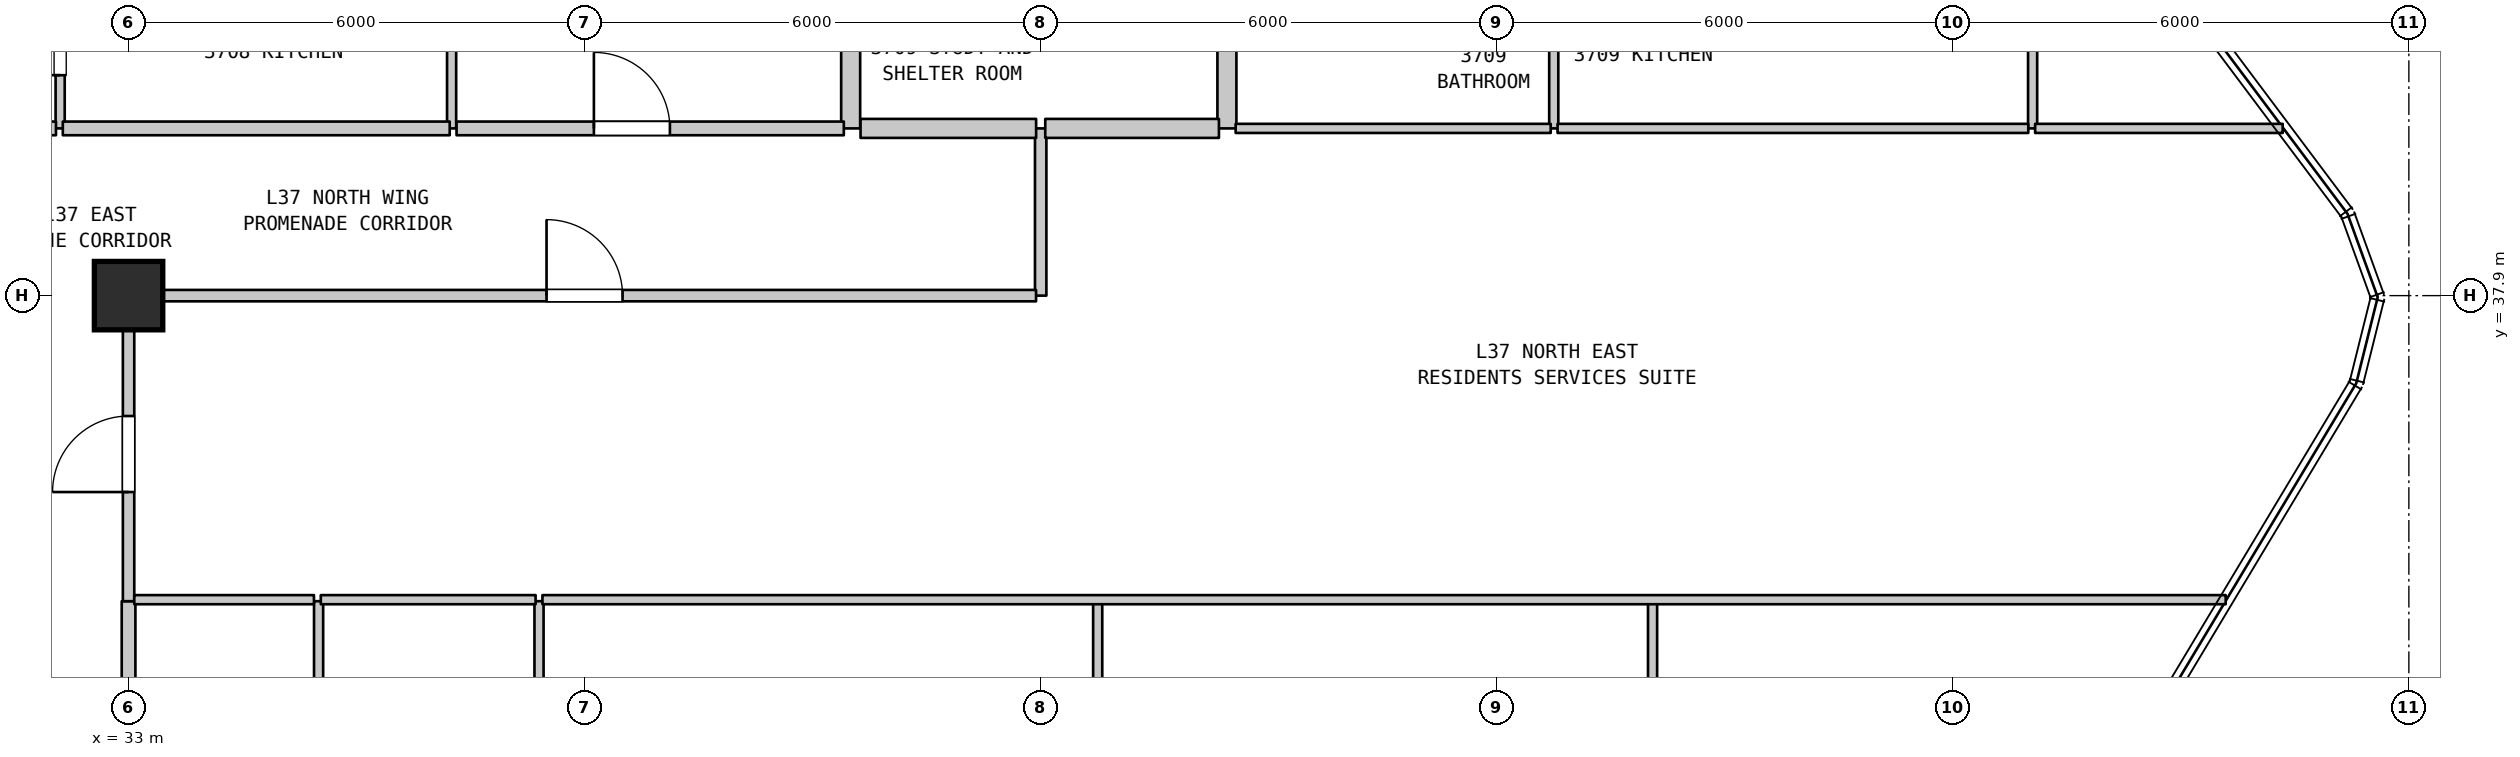
"""IFC4 building model, lengths in metres.
Left out: names, types, materials, properties, quantities, classifications, styles, units other than length and angle.
Written with IfcOpenShell. Run it as: python <this file> out.ifc"""

import sys

from ifc_helpers import new_model, si_unit, direction, frame, frame_2d, origin, origin_2d, place, context, subcontext, project, spatial, rectangle, extrude, element, fill, save


model = new_model("IFC4")
c1 = context("Model", 3, precision=1e-05, world=origin(), true_north=direction((0.0, 1.0)))
c2 = subcontext(c1, "Body", "Model", "MODEL_VIEW")
j1 = project(units=[si_unit("LENGTHUNIT", "METRE"), si_unit("PLANEANGLEUNIT", "RADIAN")], contexts=[c1])
p1 = place(None, origin())
s1 = spatial("IfcSite", under=j1, at=p1, CompositionType="ELEMENT")
p2 = place(p1, origin())
s2 = spatial("IfcBuilding", under=s1, at=p2, CompositionType="ELEMENT")
p3 = place(p2, frame((0.0, 0.0, 152.0)))
s3 = spatial("IfcBuildingStorey", under=s2, at=p3, CompositionType="ELEMENT", Elevation=152.0)
p4 = place(p3, frame((33.0, 37.9, 0.0), z_axis=(0.0, 0.0, 1.0), x_axis=(1.0, 0.0, 0.0)))
e1 = element("IfcColumn", 1, at=p4, inside=s3, PredefinedType="COLUMN", context=c2, shape_type="SweptSolid", body=[
    extrude(rectangle(XDim=0.9, YDim=0.9, at=origin_2d()), origin(), (0.0, 0.0, 1.0), 3.7),
])
p5 = place(p3, frame((32.1, 40.1, 0.0), z_axis=(0.0, 0.0, 1.0), x_axis=(0.0, 1.0, 0.0)))
e2 = element("IfcWall", 2, at=p5, inside=s3, PredefinedType="PARTITIONING", context=c2, shape_type="SweptSolid", body=[
    extrude(rectangle(XDim=2.3, YDim=0.12, at=frame_2d((1.15, 0.0))), origin(), (0.0, 0.0, 1.0), 3.385),
])
p6 = place(p5, frame((0.7, 0.0, 0.0)))
e3 = element("IfcOpeningElement", 3, at=p6, cuts=e2, PredefinedType="OPENING", context=c2, shape_type="SweptSolid", body=[
    extrude(rectangle(XDim=0.9, YDim=2.15, at=frame_2d((0.45, 1.075))), frame((0.0, 0.07, 0.0), z_axis=(0.0, -1.0, 0.0), x_axis=(1.0, 0.0, 0.0)), (0.0, 0.0, 1.0), 0.14),
])
p7 = place(p3, frame((33.0, 30.16, 0.0), z_axis=(0.0, 0.0, 1.0), x_axis=(0.0, 1.0, 0.0)))
e4 = element("IfcWall", 4, at=p7, inside=s3, PredefinedType="STANDARD", context=c2, shape_type="SweptSolid", body=[
    extrude(rectangle(XDim=3.72, YDim=0.18, at=frame_2d((1.86, 0.0))), origin(), (0.0, 0.0, 1.0), 2.885),
])
p8 = place(p3, frame((33.0, 33.88, 0.0), z_axis=(0.0, 0.0, 1.0), x_axis=(0.0, 1.0, 0.0)))
e5 = element("IfcWall", 5, at=p8, inside=s3, PredefinedType="STANDARD", context=c2, shape_type="SweptSolid", body=[
    extrude(rectangle(XDim=4.02, YDim=0.15, at=frame_2d((2.01, 0.0))), origin(), (0.0, 0.0, 1.0), 2.885),
])
p9 = place(p8, frame((1.436, 0.0, 0.0)))
e6 = element("IfcOpeningElement", 6, at=p9, cuts=e5, PredefinedType="OPENING", context=c2, shape_type="SweptSolid", body=[
    extrude(rectangle(XDim=1.0, YDim=2.15, at=frame_2d((0.5, 1.075))), frame((0.0, 0.085, 0.0), z_axis=(0.0, -1.0, 0.0), x_axis=(1.0, 0.0, 0.0)), (0.0, 0.0, 1.0), 0.17),
])
p10 = place(p3, frame((35.5, 30.16, 0.0), z_axis=(0.0, 0.0, 1.0), x_axis=(0.0, 1.0, 0.0)))
e7 = element("IfcWall", 7, at=p10, inside=s3, PredefinedType="PARTITIONING", context=c2, shape_type="SweptSolid", body=[
    extrude(rectangle(XDim=3.72, YDim=0.12, at=frame_2d((1.86, 0.0))), origin(), (0.0, 0.0, 1.0), 3.385),
])
p11 = place(p3, frame((37.25, 40.1, 0.0), z_axis=(0.0, 0.0, 1.0), x_axis=(0.0, 1.0, 0.0)))
e8 = element("IfcWall", 8, at=p11, inside=s3, PredefinedType="PARTITIONING", context=c2, shape_type="SweptSolid", body=[
    extrude(rectangle(XDim=2.05, YDim=0.12, at=frame_2d((1.025, 0.0))), origin(), (0.0, 0.0, 1.0), 3.385),
])
p12 = place(p3, frame((38.4, 30.16, 0.0), z_axis=(0.0, 0.0, 1.0), x_axis=(0.0, 1.0, 0.0)))
e9 = element("IfcWall", 9, at=p12, inside=s3, PredefinedType="PARTITIONING", context=c2, shape_type="SweptSolid", body=[
    extrude(rectangle(XDim=3.72, YDim=0.12, at=frame_2d((1.86, 0.0))), origin(), (0.0, 0.0, 1.0), 3.385),
])
p13 = place(p3, frame((42.5, 40.1, 0.0), z_axis=(0.0, 0.0, 1.0), x_axis=(0.0, 1.0, 0.0)))
e10 = element("IfcWall", 10, at=p13, inside=s3, PredefinedType="STANDARD", context=c2, shape_type="SweptSolid", body=[
    extrude(rectangle(XDim=2.3, YDim=0.25, at=frame_2d((1.15, 0.0))), origin(), (0.0, 0.0, 1.0), 3.385),
])
p14 = place(p3, frame((45.0, 37.9, 0.0), z_axis=(0.0, 0.0, 1.0), x_axis=(0.0, 1.0, 0.0)))
e11 = element("IfcWall", 11, at=p14, inside=s3, PredefinedType="STANDARD", context=c2, shape_type="SweptSolid", body=[
    extrude(rectangle(XDim=2.2, YDim=0.15, at=frame_2d((1.1, 0.0))), origin(), (0.0, 0.0, 1.0), 3.385),
])
p15 = place(p3, frame((45.75, 30.16, 0.0), z_axis=(0.0, 0.0, 1.0), x_axis=(0.0, 1.0, 0.0)))
e12 = element("IfcWall", 12, at=p15, inside=s3, PredefinedType="PARTITIONING", context=c2, shape_type="SweptSolid", body=[
    extrude(rectangle(XDim=3.72, YDim=0.12, at=frame_2d((1.86, 0.0))), origin(), (0.0, 0.0, 1.0), 3.385),
])
p16 = place(p3, frame((47.45, 40.1, 0.0), z_axis=(0.0, 0.0, 1.0), x_axis=(0.0, 1.0, 0.0)))
e13 = element("IfcWall", 13, at=p16, inside=s3, PredefinedType="STANDARD", context=c2, shape_type="SweptSolid", body=[
    extrude(rectangle(XDim=2.3, YDim=0.25, at=frame_2d((1.15, 0.0))), origin(), (0.0, 0.0, 1.0), 3.385),
])
p17 = place(p3, frame((51.75, 40.1, 0.0), z_axis=(0.0, 0.0, 1.0), x_axis=(0.0, 1.0, 0.0)))
e14 = element("IfcWall", 14, at=p17, inside=s3, PredefinedType="PARTITIONING", context=c2, shape_type="SweptSolid", body=[
    extrude(rectangle(XDim=2.3, YDim=0.12, at=frame_2d((1.15, 0.0))), origin(), (0.0, 0.0, 1.0), 3.385),
])
p18 = place(p3, frame((53.05, 30.16, 0.0), z_axis=(0.0, 0.0, 1.0), x_axis=(0.0, 1.0, 0.0)))
e15 = element("IfcWall", 15, at=p18, inside=s3, PredefinedType="PARTITIONING", context=c2, shape_type="SweptSolid", body=[
    extrude(rectangle(XDim=3.72, YDim=0.12, at=frame_2d((1.86, 0.0))), origin(), (0.0, 0.0, 1.0), 3.385),
])
p19 = place(p3, frame((58.05, 40.1, 0.0), z_axis=(0.0, 0.0, 1.0), x_axis=(0.0, 1.0, 0.0)))
e16 = element("IfcWall", 16, at=p19, inside=s3, PredefinedType="PARTITIONING", context=c2, shape_type="SweptSolid", body=[
    extrude(rectangle(XDim=2.3, YDim=0.12, at=frame_2d((1.15, 0.0))), origin(), (0.0, 0.0, 1.0), 3.385),
])
p20 = place(p3, frame((33.075, 33.9, 0.0), z_axis=(0.0, 0.0, 1.0), x_axis=(1.0, 0.0, 0.0)))
e17 = element("IfcWall", 17, at=p20, inside=s3, PredefinedType="PARTITIONING", context=c2, shape_type="SweptSolid", body=[
    extrude(rectangle(XDim=2.364, YDim=0.12, at=frame_2d((1.182, 0.0))), origin(), (0.0, 0.0, 1.0), 3.385),
])
p21 = place(p3, frame((35.529, 33.9, 0.0), z_axis=(0.0, 0.0, 1.0), x_axis=(1.0, 0.0, 0.0)))
e18 = element("IfcWall", 18, at=p21, inside=s3, PredefinedType="PARTITIONING", context=c2, shape_type="SweptSolid", body=[
    extrude(rectangle(XDim=2.826, YDim=0.12, at=frame_2d((1.413, 0.0))), origin(), (0.0, 0.0, 1.0), 3.385),
])
p22 = place(p3, frame((38.445, 33.9, 0.0), z_axis=(0.0, 0.0, 1.0), x_axis=(1.0, 0.0, 0.0)))
e19 = element("IfcWall", 19, at=p22, inside=s3, PredefinedType="PARTITIONING", context=c2, shape_type="SweptSolid", body=[
    extrude(rectangle(XDim=22.145, YDim=0.12, at=frame_2d((11.073, 0.0))), origin(), (0.0, 0.0, 1.0), 3.385),
])
p23 = place(p3, frame((33.06, 37.9, 0.0), z_axis=(0.0, 0.0, 1.0), x_axis=(1.0, 0.0, 0.0)))
e20 = element("IfcWall", 20, at=p23, inside=s3, PredefinedType="STANDARD", context=c2, shape_type="SweptSolid", body=[
    extrude(rectangle(XDim=11.879, YDim=0.15, at=frame_2d((5.939, 0.0))), origin(), (0.0, 0.0, 1.0), 3.385),
])
p24 = place(p23, frame((5.439, 0.0, 0.0)))
e21 = element("IfcOpeningElement", 21, at=p24, cuts=e20, PredefinedType="OPENING", context=c2, shape_type="SweptSolid", body=[
    extrude(rectangle(XDim=1.0, YDim=2.15, at=frame_2d((0.5, 1.075))), frame((0.0, 0.085, 0.0), z_axis=(0.0, -1.0, 0.0), x_axis=(1.0, 0.0, 0.0)), (0.0, 0.0, 1.0), 0.17),
])
p25 = place(p3, frame((28.535, 40.1, 0.0), z_axis=(0.0, 0.0, 1.0), x_axis=(1.0, 0.0, 0.0)))
e22 = element("IfcWall", 22, at=p25, inside=s3, PredefinedType="STANDARD", context=c2, shape_type="SweptSolid", body=[
    extrude(rectangle(XDim=3.51, YDim=0.18, at=frame_2d((1.755, 0.0))), origin(), (0.0, 0.0, 1.0), 3.385),
])
p26 = place(p25, frame((1.185, 0.0, 0.0)))
e23 = element("IfcOpeningElement", 23, at=p26, cuts=e22, PredefinedType="OPENING", context=c2, shape_type="SweptSolid", body=[
    extrude(rectangle(XDim=1.0, YDim=2.15, at=frame_2d((0.5, 1.075))), frame((0.0, 0.1, 0.0), z_axis=(0.0, -1.0, 0.0), x_axis=(1.0, 0.0, 0.0)), (0.0, 0.0, 1.0), 0.2),
])
p27 = place(p3, frame((32.135, 40.1, 0.0), z_axis=(0.0, 0.0, 1.0), x_axis=(1.0, 0.0, 0.0)))
e24 = element("IfcWall", 24, at=p27, inside=s3, PredefinedType="STANDARD", context=c2, shape_type="SweptSolid", body=[
    extrude(rectangle(XDim=5.09, YDim=0.18, at=frame_2d((2.545, 0.0))), origin(), (0.0, 0.0, 1.0), 3.385),
])
p28 = place(p3, frame((37.315, 40.1, 0.0), z_axis=(0.0, 0.0, 1.0), x_axis=(1.0, 0.0, 0.0)))
e25 = element("IfcWall", 25, at=p28, inside=s3, PredefinedType="STANDARD", context=c2, shape_type="SweptSolid", body=[
    extrude(rectangle(XDim=5.095, YDim=0.18, at=frame_2d((2.547, 0.0))), origin(), (0.0, 0.0, 1.0), 3.385),
])
p29 = place(p28, frame((1.807, 0.0, 0.0)))
e26 = element("IfcOpeningElement", 26, at=p29, cuts=e25, PredefinedType="OPENING", context=c2, shape_type="SweptSolid", body=[
    extrude(rectangle(XDim=1.0, YDim=2.15, at=frame_2d((0.5, 1.075))), frame((0.0, 0.1, 0.0), z_axis=(0.0, -1.0, 0.0), x_axis=(1.0, 0.0, 0.0)), (0.0, 0.0, 1.0), 0.2),
])
p30 = place(p3, frame((42.63, 40.1, 0.0), z_axis=(0.0, 0.0, 1.0), x_axis=(1.0, 0.0, 0.0)))
e27 = element("IfcWall", 27, at=p30, inside=s3, PredefinedType="STANDARD", context=c2, shape_type="SweptSolid", body=[
    extrude(rectangle(XDim=2.31, YDim=0.25, at=frame_2d((1.155, 0.0))), origin(), (0.0, 0.0, 1.0), 3.385),
])
p31 = place(p3, frame((45.06, 40.1, 0.0), z_axis=(0.0, 0.0, 1.0), x_axis=(1.0, 0.0, 0.0)))
e28 = element("IfcWall", 28, at=p31, inside=s3, PredefinedType="STANDARD", context=c2, shape_type="SweptSolid", body=[
    extrude(rectangle(XDim=2.285, YDim=0.25, at=frame_2d((1.143, 0.0))), origin(), (0.0, 0.0, 1.0), 3.385),
])
p32 = place(p3, frame((47.565, 40.1, 0.0), z_axis=(0.0, 0.0, 1.0), x_axis=(1.0, 0.0, 0.0)))
e29 = element("IfcWall", 29, at=p32, inside=s3, PredefinedType="PARTITIONING", context=c2, shape_type="SweptSolid", body=[
    extrude(rectangle(XDim=4.145, YDim=0.12, at=frame_2d((2.073, 0.0))), origin(), (0.0, 0.0, 1.0), 3.385),
])
p33 = place(p3, frame((51.8, 40.1, 0.0), z_axis=(0.0, 0.0, 1.0), x_axis=(1.0, 0.0, 0.0)))
e30 = element("IfcWall", 30, at=p33, inside=s3, PredefinedType="PARTITIONING", context=c2, shape_type="SweptSolid", body=[
    extrude(rectangle(XDim=6.193, YDim=0.12, at=frame_2d((3.096, 0.0))), origin(), (0.0, 0.0, 1.0), 3.385),
])
p34 = place(p3, frame((58.083, 40.1, 0.0), z_axis=(0.0, 0.0, 1.0), x_axis=(1.0, 0.0, 0.0)))
e31 = element("IfcWall", 31, at=p34, inside=s3, PredefinedType="PARTITIONING", context=c2, shape_type="SweptSolid", body=[
    extrude(rectangle(XDim=3.257, YDim=0.12, at=frame_2d((1.628, 0.0))), origin(), (0.0, 0.0, 1.0), 3.385),
])
p35 = place(p6, origin())
e32 = element("IfcDoor", 32, at=p35, inside=s3, OperationType="SINGLE_SWING_LEFT", PredefinedType="DOOR", context=c2, shape_type="SweptSolid", body=[
    extrude(rectangle(XDim=0.9, YDim=2.15, at=frame_2d((0.45, 1.075))), frame((0.0, 0.025, 0.0), z_axis=(0.0, -1.0, 0.0), x_axis=(1.0, 0.0, 0.0)), (0.0, 0.0, 1.0), 0.05),
])
fill(e3, e32)
p36 = place(p9, origin())
e33 = element("IfcDoor", 33, at=p36, inside=s3, OperationType="SINGLE_SWING_LEFT", PredefinedType="DOOR", context=c2, shape_type="SweptSolid", body=[
    extrude(rectangle(XDim=1.0, YDim=2.15, at=frame_2d((0.5, 1.075))), frame((0.0, 0.025, 0.0), z_axis=(0.0, -1.0, 0.0), x_axis=(1.0, 0.0, 0.0)), (0.0, 0.0, 1.0), 0.05),
])
fill(e6, e33)
p37 = place(p24, origin())
e34 = element("IfcDoor", 34, at=p37, inside=s3, OperationType="SINGLE_SWING_LEFT", PredefinedType="DOOR", context=c2, shape_type="SweptSolid", body=[
    extrude(rectangle(XDim=1.0, YDim=2.15, at=frame_2d((0.5, 1.075))), frame((0.0, 0.025, 0.0), z_axis=(0.0, -1.0, 0.0), x_axis=(1.0, 0.0, 0.0)), (0.0, 0.0, 1.0), 0.05),
])
fill(e21, e34)
p38 = place(p29, origin())
e35 = element("IfcDoor", 35, at=p38, inside=s3, OperationType="SINGLE_SWING_LEFT", PredefinedType="DOOR", context=c2, shape_type="SweptSolid", body=[
    extrude(rectangle(XDim=1.0, YDim=2.15, at=frame_2d((0.5, 1.075))), frame((0.0, 0.025, 0.0), z_axis=(0.0, -1.0, 0.0), x_axis=(1.0, 0.0, 0.0)), (0.0, 0.0, 1.0), 0.05),
])
fill(e26, e35)
save(model, sys.argv[1])
